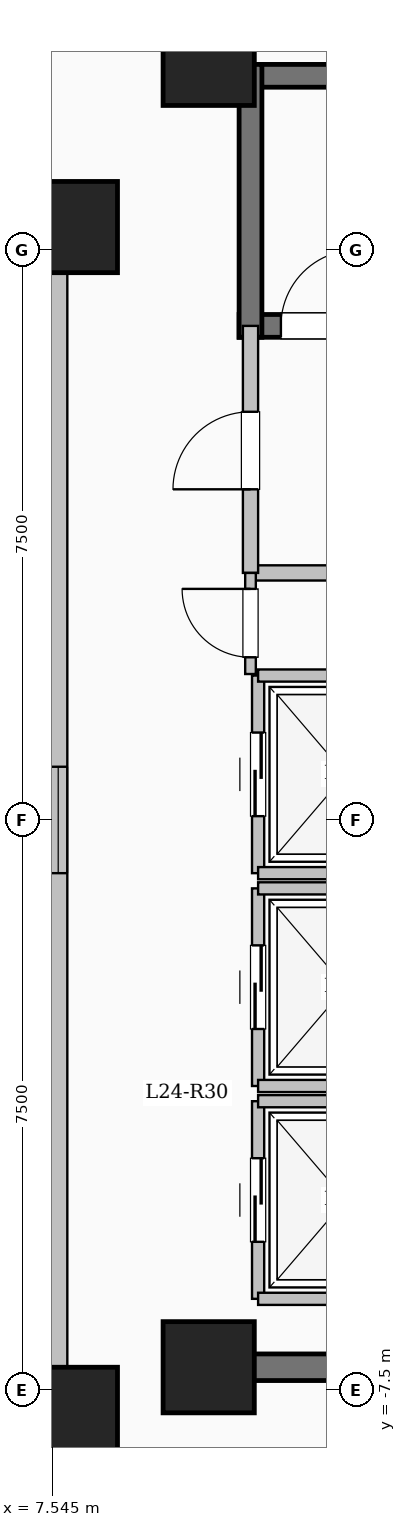
"""IFC4 building model, lengths in metres.
Left out: names, types, materials, properties, quantities, classifications, styles, units other than length and angle.
Written with IfcOpenShell. Run it as: python <this file> out.ifc"""

import sys

from ifc_helpers import new_model, si_unit, direction, frame, frame_2d, origin, origin_2d, place, context, subcontext, project, spatial, rectangle, extrude, element, fill, save


model = new_model("IFC4")
c1 = context("Model", 3, precision=1e-05, world=origin(), true_north=direction((0.0, 1.0)))
c2 = subcontext(c1, "Body", "Model", "MODEL_VIEW")
j1 = project(units=[si_unit("LENGTHUNIT", "METRE"), si_unit("PLANEANGLEUNIT", "RADIAN")], contexts=[c1])
p1 = place(None, origin())
s1 = spatial("IfcSite", under=j1, at=p1, CompositionType="ELEMENT")
p2 = place(p1, origin())
s2 = spatial("IfcBuilding", under=s1, at=p2, CompositionType="ELEMENT")
p3 = place(p2, frame((0.0, 0.0, 91.7)))
s3 = spatial("IfcBuildingStorey", under=s2, at=p3, CompositionType="ELEMENT", Elevation=91.7)
for number, where, z_axis, x_axis in (
    (1, (7.8, -7.8, 0.0), (0.0, 0.0, 1.0), (1.0, 0.0, 0.0)),
    (2, (7.8, 7.8, 0.0), (0.0, 0.0, 1.0), (1.0, 0.0, 0.0)),
    (3, (9.6, -7.2, 0.0), (0.0, 0.0, 1.0), (1.0, 0.0, 0.0)),
    (4, (9.6, 10.0, 0.0), (0.0, 0.0, 1.0), (1.0, 0.0, 0.0)),
):
    element("IfcColumn", number, at=place(p3, frame(where, z_axis=z_axis, x_axis=x_axis)), inside=s3, PredefinedType="COLUMN", context=c2, shape_type="SweptSolid", body=[
        extrude(rectangle(XDim=1.2, YDim=1.2, at=origin_2d()), origin(), (0.0, 0.0, 1.0), 3.35),
    ])
p4 = place(p3, frame((-7.62, -7.62, 0.0), z_axis=(0.0, 0.0, 1.0), x_axis=(1.0, 0.0, 0.0)))
e5 = element("IfcWall", 5, at=p4, inside=s3, PredefinedType="SOLIDWALL", context=c2, shape_type="SweptSolid", body=[
    extrude(rectangle(XDim=15.24, YDim=0.24, at=frame_2d((7.62, 0.0))), origin(), (0.0, 0.0, 1.0), 3.1),
])
p5 = place(p4, frame((6.92, 0.0, 0.95)))
e6 = element("IfcOpeningElement", 6, at=p5, cuts=e5, PredefinedType="OPENING", context=c2, shape_type="SweptSolid", body=[
    extrude(rectangle(XDim=1.4, YDim=1.5, at=frame_2d((0.7, 0.75))), frame((0.0, 0.13, 0.0), z_axis=(0.0, -1.0, 0.0), x_axis=(1.0, 0.0, 0.0)), (0.0, 0.0, 1.0), 0.26),
])
p6 = place(p3, frame((7.62, -7.62, 0.0), z_axis=(0.0, 0.0, 1.0), x_axis=(0.0, 1.0, 0.0)))
e7 = element("IfcWall", 7, at=p6, inside=s3, PredefinedType="SOLIDWALL", context=c2, shape_type="SweptSolid", body=[
    extrude(rectangle(XDim=15.24, YDim=0.24, at=frame_2d((7.62, 0.0))), origin(), (0.0, 0.0, 1.0), 3.1),
])
p7 = place(p6, frame((6.92, 0.0, 0.95)))
e8 = element("IfcOpeningElement", 8, at=p7, cuts=e7, PredefinedType="OPENING", context=c2, shape_type="SweptSolid", body=[
    extrude(rectangle(XDim=1.4, YDim=1.5, at=frame_2d((0.7, 0.75))), frame((0.0, 0.13, 0.0), z_axis=(0.0, -1.0, 0.0), x_axis=(1.0, 0.0, 0.0)), (0.0, 0.0, 1.0), 0.26),
])
p8 = place(p3, frame((7.62, 7.62, 0.0), z_axis=(0.0, 0.0, 1.0), x_axis=(-1.0, 0.0, 0.0)))
e9 = element("IfcWall", 9, at=p8, inside=s3, PredefinedType="SOLIDWALL", context=c2, shape_type="SweptSolid", body=[
    extrude(rectangle(XDim=15.24, YDim=0.24, at=frame_2d((7.62, 0.0))), origin(), (0.0, 0.0, 1.0), 3.1),
])
p9 = place(p8, frame((6.92, 0.0, 0.95)))
e10 = element("IfcOpeningElement", 10, at=p9, cuts=e9, PredefinedType="OPENING", context=c2, shape_type="SweptSolid", body=[
    extrude(rectangle(XDim=1.4, YDim=1.5, at=frame_2d((0.7, 0.75))), frame((0.0, 0.13, 0.0), z_axis=(0.0, -1.0, 0.0), x_axis=(1.0, 0.0, 0.0)), (0.0, 0.0, 1.0), 0.26),
])
p10 = place(p3, frame((10.0, 9.79, 0.0), z_axis=(0.0, 0.0, 1.0), x_axis=(1.0, 0.0, 0.0)))
e11 = element("IfcWall", 11, at=p10, inside=s3, PredefinedType="SHEAR", context=c2, shape_type="SweptSolid", body=[
    extrude(rectangle(XDim=8.0, YDim=0.3, at=frame_2d((4.0, 0.0))), origin(), (0.0, 0.0, 1.0), 3.35),
])
p11 = place(p3, frame((10.0, 6.5, 0.0), z_axis=(0.0, 0.0, 1.0), x_axis=(1.0, 0.0, 0.0)))
e12 = element("IfcWall", 12, at=p11, inside=s3, PredefinedType="SHEAR", context=c2, shape_type="SweptSolid", body=[
    extrude(rectangle(XDim=8.0, YDim=0.3, at=frame_2d((4.0, 0.0))), origin(), (0.0, 0.0, 1.0), 3.35),
])
p12 = place(p11, frame((0.55, 0.0, 0.0)))
e13 = element("IfcOpeningElement", 13, at=p12, cuts=e12, PredefinedType="OPENING", context=c2, shape_type="SweptSolid", body=[
    extrude(rectangle(XDim=1.0, YDim=2.15, at=frame_2d((0.5, 1.075))), frame((0.0, 0.16, 0.0), z_axis=(0.0, -1.0, 0.0), x_axis=(1.0, 0.0, 0.0)), (0.0, 0.0, 1.0), 0.32),
])
p13 = place(p3, frame((10.15, 6.35, 0.0), z_axis=(0.0, 0.0, 1.0), x_axis=(0.0, 1.0, 0.0)))
e14 = element("IfcWall", 14, at=p13, inside=s3, PredefinedType="SHEAR", context=c2, shape_type="SweptSolid", body=[
    extrude(rectangle(XDim=3.59, YDim=0.3, at=frame_2d((1.795, 0.0))), origin(), (0.0, 0.0, 1.0), 3.35),
])
p14 = place(p3, frame((10.15, 3.25, 0.0), z_axis=(0.0, 0.0, 1.0), x_axis=(1.0, 0.0, 0.0)))
e15 = element("IfcWall", 15, at=p14, inside=s3, PredefinedType="SOLIDWALL", context=c2, shape_type="SweptSolid", body=[
    extrude(rectangle(XDim=5.4, YDim=0.2, at=frame_2d((2.7, 0.0))), origin(), (0.0, 0.0, 1.0), 3.1),
])
p15 = place(p3, frame((10.15, 3.25, 0.0), z_axis=(0.0, 0.0, 1.0), x_axis=(0.0, 1.0, 0.0)))
e16 = element("IfcWall", 16, at=p15, inside=s3, PredefinedType="SOLIDWALL", context=c2, shape_type="SweptSolid", body=[
    extrude(rectangle(XDim=3.25, YDim=0.2, at=frame_2d((1.625, 0.0))), origin(), (0.0, 0.0, 1.0), 3.1),
])
p16 = place(p15, frame((1.1, 0.0, 0.0)))
e17 = element("IfcOpeningElement", 17, at=p16, cuts=e16, PredefinedType="OPENING", context=c2, shape_type="SweptSolid", body=[
    extrude(rectangle(XDim=1.02, YDim=2.15, at=frame_2d((0.51, 1.075))), frame((0.0, 0.11, 0.0), z_axis=(0.0, -1.0, 0.0), x_axis=(1.0, 0.0, 0.0)), (0.0, 0.0, 1.0), 0.22),
])
p17 = place(p3, frame((10.25, -6.3, 0.0), z_axis=(0.0, 0.0, 1.0), x_axis=(0.0, 1.0, 0.0)))
e18 = element("IfcWall", 18, at=p17, inside=s3, PredefinedType="SOLIDWALL", context=c2, shape_type="SweptSolid", body=[
    extrude(rectangle(XDim=2.6, YDim=0.16, at=frame_2d((1.3, 0.0))), origin(), (0.0, 0.0, 1.0), 3.1),
])
p18 = place(p17, frame((0.75, 0.0, 0.0)))
e19 = element("IfcOpeningElement", 19, at=p18, cuts=e18, PredefinedType="OPENING", context=c2, shape_type="SweptSolid", body=[
    extrude(rectangle(XDim=1.1, YDim=2.15, at=frame_2d((0.55, 1.075))), frame((0.0, 0.09, 0.0), z_axis=(0.0, -1.0, 0.0), x_axis=(1.0, 0.0, 0.0)), (0.0, 0.0, 1.0), 0.18),
])
for number, where, z_axis, x_axis in (
    (20, (10.25, -6.3, 0.0), (0.0, 0.0, 1.0), (1.0, 0.0, 0.0)),
    (21, (10.25, -3.7, 0.0), (0.0, 0.0, 1.0), (1.0, 0.0, 0.0)),
):
    element("IfcWall", number, at=place(p3, frame(where, z_axis=z_axis, x_axis=x_axis)), inside=s3, PredefinedType="SOLIDWALL", context=c2, shape_type="SweptSolid", body=[
        extrude(rectangle(XDim=2.3, YDim=0.16, at=frame_2d((1.15, 0.0))), origin(), (0.0, 0.0, 1.0), 3.1),
    ])
p19 = place(p3, frame((10.25, -3.5, 0.0), z_axis=(0.0, 0.0, 1.0), x_axis=(0.0, 1.0, 0.0)))
e22 = element("IfcWall", 22, at=p19, inside=s3, PredefinedType="SOLIDWALL", context=c2, shape_type="SweptSolid", body=[
    extrude(rectangle(XDim=2.6, YDim=0.16, at=frame_2d((1.3, 0.0))), origin(), (0.0, 0.0, 1.0), 3.1),
])
p20 = place(p19, frame((0.75, 0.0, 0.0)))
e23 = element("IfcOpeningElement", 23, at=p20, cuts=e22, PredefinedType="OPENING", context=c2, shape_type="SweptSolid", body=[
    extrude(rectangle(XDim=1.1, YDim=2.15, at=frame_2d((0.55, 1.075))), frame((0.0, 0.09, 0.0), z_axis=(0.0, -1.0, 0.0), x_axis=(1.0, 0.0, 0.0)), (0.0, 0.0, 1.0), 0.18),
])
for number, where, z_axis, x_axis in (
    (24, (10.25, -3.5, 0.0), (0.0, 0.0, 1.0), (1.0, 0.0, 0.0)),
    (25, (10.25, -0.9, 0.0), (0.0, 0.0, 1.0), (1.0, 0.0, 0.0)),
):
    element("IfcWall", number, at=place(p3, frame(where, z_axis=z_axis, x_axis=x_axis)), inside=s3, PredefinedType="SOLIDWALL", context=c2, shape_type="SweptSolid", body=[
        extrude(rectangle(XDim=2.3, YDim=0.16, at=frame_2d((1.15, 0.0))), origin(), (0.0, 0.0, 1.0), 3.1),
    ])
p21 = place(p3, frame((10.25, -0.7, 0.0), z_axis=(0.0, 0.0, 1.0), x_axis=(0.0, 1.0, 0.0)))
e26 = element("IfcWall", 26, at=p21, inside=s3, PredefinedType="SOLIDWALL", context=c2, shape_type="SweptSolid", body=[
    extrude(rectangle(XDim=2.6, YDim=0.16, at=frame_2d((1.3, 0.0))), origin(), (0.0, 0.0, 1.0), 3.1),
])
p22 = place(p21, frame((0.75, 0.0, 0.0)))
e27 = element("IfcOpeningElement", 27, at=p22, cuts=e26, PredefinedType="OPENING", context=c2, shape_type="SweptSolid", body=[
    extrude(rectangle(XDim=1.1, YDim=2.15, at=frame_2d((0.55, 1.075))), frame((0.0, 0.09, 0.0), z_axis=(0.0, -1.0, 0.0), x_axis=(1.0, 0.0, 0.0)), (0.0, 0.0, 1.0), 0.18),
])
for number, where, z_axis, x_axis in (
    (28, (10.25, -0.7, 0.0), (0.0, 0.0, 1.0), (1.0, 0.0, 0.0)),
    (29, (10.25, 1.9, 0.0), (0.0, 0.0, 1.0), (1.0, 0.0, 0.0)),
):
    element("IfcWall", number, at=place(p3, frame(where, z_axis=z_axis, x_axis=x_axis)), inside=s3, PredefinedType="SOLIDWALL", context=c2, shape_type="SweptSolid", body=[
        extrude(rectangle(XDim=2.3, YDim=0.16, at=frame_2d((1.15, 0.0))), origin(), (0.0, 0.0, 1.0), 3.1),
    ])
p23 = place(p3, frame((10.075, -7.2, 0.0), z_axis=(0.0, 0.0, 1.0), x_axis=(1.0, 0.0, 0.0)))
e30 = element("IfcWall", 30, at=p23, inside=s3, PredefinedType="SHEAR", context=c2, shape_type="SweptSolid", body=[
    extrude(rectangle(XDim=8.55, YDim=0.35, at=frame_2d((4.275, 0.0))), origin(), (0.0, 0.0, 1.0), 3.35),
])
p24 = place(p3, frame((10.15, 1.92, 0.0), z_axis=(0.0, 0.0, 1.0), x_axis=(0.0, 1.0, 0.0)))
e31 = element("IfcWall", 31, at=p24, inside=s3, PredefinedType="PARTITIONING", context=c2, shape_type="SweptSolid", body=[
    extrude(rectangle(XDim=1.33, YDim=0.14, at=frame_2d((0.665, 0.0))), origin(), (0.0, 0.0, 1.0), 3.1),
])
p25 = place(p24, frame((0.22, 0.0, 0.0)))
e32 = element("IfcOpeningElement", 32, at=p25, cuts=e31, PredefinedType="OPENING", context=c2, shape_type="SweptSolid", body=[
    extrude(rectangle(XDim=0.9, YDim=2.08, at=frame_2d((0.45, 1.04))), frame((0.0, 0.08, 0.0), z_axis=(0.0, -1.0, 0.0), x_axis=(1.0, 0.0, 0.0)), (0.0, 0.0, 1.0), 0.16),
])
p26 = place(p7, origin())
e33 = element("IfcWindow", 33, at=p26, inside=s3, PartitioningType="SINGLE_PANEL", PredefinedType="WINDOW", context=c2, shape_type="SweptSolid", body=[
    extrude(rectangle(XDim=1.4, YDim=1.5, at=frame_2d((0.7, 0.75))), frame((0.0, 0.03, 0.0), z_axis=(0.0, -1.0, 0.0), x_axis=(1.0, 0.0, 0.0)), (0.0, 0.0, 1.0), 0.06),
])
fill(e8, e33)
p27 = place(p12, origin())
e34 = element("IfcDoor", 34, at=p27, inside=s3, OperationType="SINGLE_SWING_RIGHT", PredefinedType="DOOR", context=c2, shape_type="SweptSolid", body=[
    extrude(rectangle(XDim=1.0, YDim=2.15, at=frame_2d((0.5, 1.075))), frame((0.0, 0.025, 0.0), z_axis=(0.0, -1.0, 0.0), x_axis=(1.0, 0.0, 0.0)), (0.0, 0.0, 1.0), 0.05),
])
fill(e13, e34)
p28 = place(p16, origin())
e35 = element("IfcDoor", 35, at=p28, inside=s3, OperationType="SINGLE_SWING_LEFT", PredefinedType="DOOR", context=c2, shape_type="SweptSolid", body=[
    extrude(rectangle(XDim=1.02, YDim=2.15, at=frame_2d((0.51, 1.075))), frame((0.0, 0.025, 0.0), z_axis=(0.0, -1.0, 0.0), x_axis=(1.0, 0.0, 0.0)), (0.0, 0.0, 1.0), 0.05),
])
fill(e17, e35)
p29 = place(p18, origin())
e36 = element("IfcDoor", 36, at=p29, inside=s3, OperationType="SLIDING_TO_LEFT", PredefinedType="DOOR", context=c2, shape_type="SweptSolid", body=[
    extrude(rectangle(XDim=1.1, YDim=2.15, at=frame_2d((0.55, 1.075))), frame((0.0, 0.025, 0.0), z_axis=(0.0, -1.0, 0.0), x_axis=(1.0, 0.0, 0.0)), (0.0, 0.0, 1.0), 0.05),
])
fill(e19, e36)
p30 = place(p20, origin())
e37 = element("IfcDoor", 37, at=p30, inside=s3, OperationType="SLIDING_TO_LEFT", PredefinedType="DOOR", context=c2, shape_type="SweptSolid", body=[
    extrude(rectangle(XDim=1.1, YDim=2.15, at=frame_2d((0.55, 1.075))), frame((0.0, 0.025, 0.0), z_axis=(0.0, -1.0, 0.0), x_axis=(1.0, 0.0, 0.0)), (0.0, 0.0, 1.0), 0.05),
])
fill(e23, e37)
p31 = place(p22, origin())
e38 = element("IfcDoor", 38, at=p31, inside=s3, OperationType="SLIDING_TO_LEFT", PredefinedType="DOOR", context=c2, shape_type="SweptSolid", body=[
    extrude(rectangle(XDim=1.1, YDim=2.15, at=frame_2d((0.55, 1.075))), frame((0.0, 0.025, 0.0), z_axis=(0.0, -1.0, 0.0), x_axis=(1.0, 0.0, 0.0)), (0.0, 0.0, 1.0), 0.05),
])
fill(e27, e38)
p32 = place(p25, origin())
e39 = element("IfcDoor", 39, at=p32, inside=s3, OperationType="SINGLE_SWING_RIGHT", PredefinedType="DOOR", context=c2, shape_type="SweptSolid", body=[
    extrude(rectangle(XDim=0.9, YDim=2.08, at=frame_2d((0.45, 1.04))), frame((0.0, 0.025, 0.0), z_axis=(0.0, -1.0, 0.0), x_axis=(1.0, 0.0, 0.0)), (0.0, 0.0, 1.0), 0.05),
])
fill(e32, e39)
save(model, sys.argv[1])
